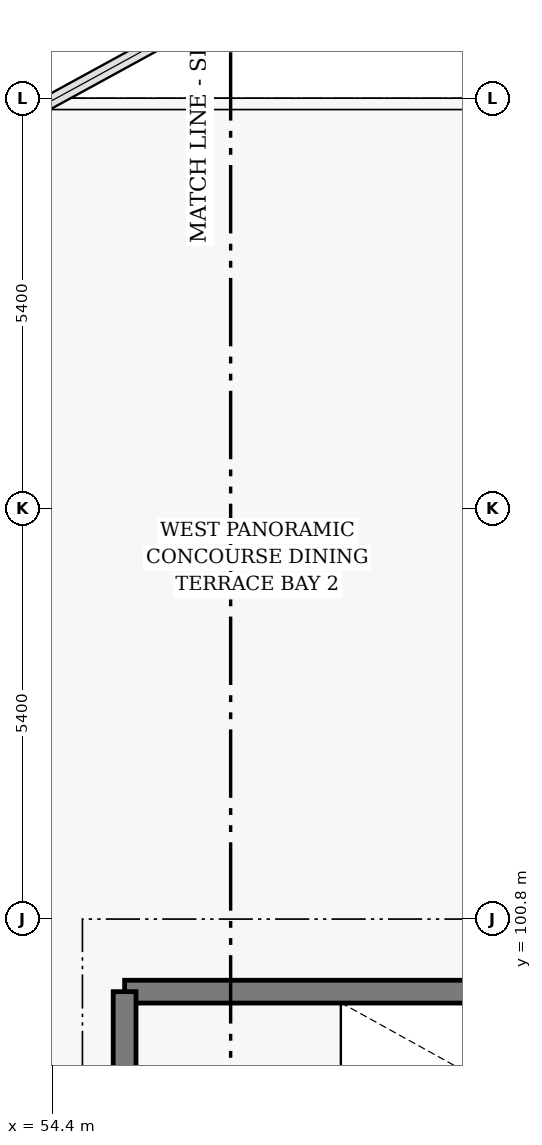
"""IFC4 building model, lengths in metres.
Left out: names, types, materials, properties, quantities, classifications, styles, units other than length and angle.
Written with IfcOpenShell. Run it as: python <this file> out.ifc"""

import sys

from ifc_helpers import new_model, si_unit, direction, frame, frame_2d, origin, place, context, subcontext, project, spatial, rectangle, extrude, element, save


model = new_model("IFC4")
c1 = context("Model", 3, precision=1e-05, world=origin(), true_north=direction((0.0, 1.0)))
c2 = subcontext(c1, "Body", "Model", "MODEL_VIEW")
j1 = project(units=[si_unit("LENGTHUNIT", "METRE"), si_unit("PLANEANGLEUNIT", "RADIAN")], contexts=[c1])
p1 = place(None, origin())
s1 = spatial("IfcSite", under=j1, at=p1, CompositionType="ELEMENT")
p2 = place(p1, origin())
s2 = spatial("IfcBuilding", under=s1, at=p2, CompositionType="ELEMENT")
p3 = place(p2, frame((0.0, 0.0, 12.6)))
s3 = spatial("IfcBuildingStorey", under=s2, at=p3, CompositionType="ELEMENT", Elevation=12.6)
p4 = place(p3, frame((55.355, 99.845, 0.0), z_axis=(0.0, 0.0, 1.0), x_axis=(1.0, 0.0, 0.0)))
e1 = element("IfcWall", 1, at=p4, inside=s3, PredefinedType="SOLIDWALL", context=c2, shape_type="SweptSolid", body=[
    extrude(rectangle(XDim=10.04, YDim=0.3, at=frame_2d((5.02, 0.0))), origin(), (0.0, 0.0, 1.0), 4.5),
])
p5 = place(p3, frame((55.355, 95.655, 0.0), z_axis=(0.0, 0.0, 1.0), x_axis=(0.0, 1.0, 0.0)))
e2 = element("IfcWall", 2, at=p5, inside=s3, PredefinedType="SOLIDWALL", context=c2, shape_type="SweptSolid", body=[
    extrude(rectangle(XDim=4.19, YDim=0.3, at=frame_2d((2.095, 0.0))), origin(), (0.0, 0.0, 1.0), 4.5),
])
save(model, sys.argv[1])
